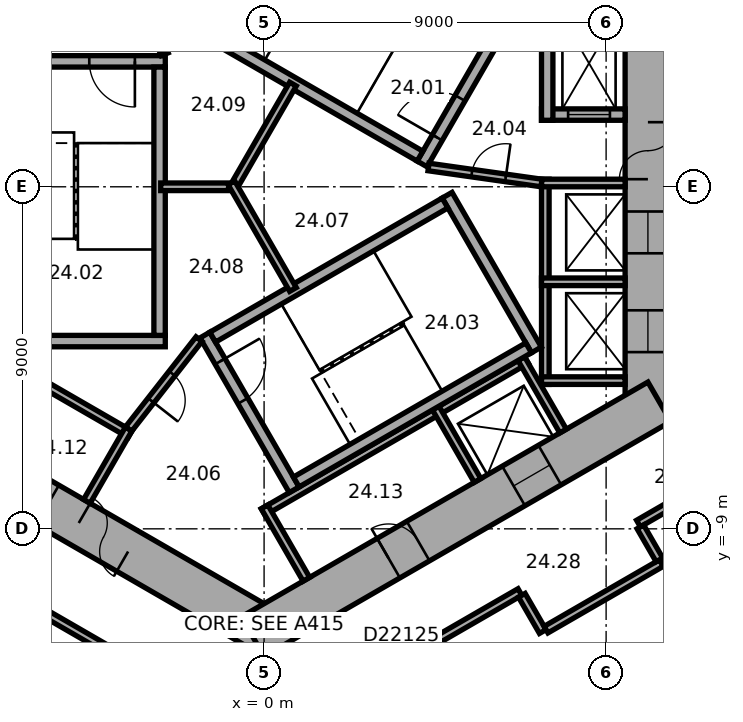
"""IFC4 building model, lengths in metres.
Left out: names, types, materials, properties, quantities, classifications, styles, units other than length and angle.
Written with IfcOpenShell. Run it as: python <this file> out.ifc"""

import sys

from ifc_helpers import new_model, si_unit, direction, frame, frame_2d, origin, place, context, subcontext, project, spatial, rectangle, extrude, element, fill, save


model = new_model("IFC4")
c1 = context("Model", 3, precision=1e-05, world=origin(), true_north=direction((0.0, 1.0)))
c2 = subcontext(c1, "Body", "Model", "MODEL_VIEW")
j1 = project(units=[si_unit("LENGTHUNIT", "METRE"), si_unit("PLANEANGLEUNIT", "RADIAN")], contexts=[c1])
p1 = place(None, origin())
s1 = spatial("IfcSite", under=j1, at=p1, CompositionType="ELEMENT")
p2 = place(p1, origin())
s2 = spatial("IfcBuilding", under=s1, at=p2, CompositionType="ELEMENT")
p3 = place(p2, frame((0.0, 0.0, 103.4)))
s3 = spatial("IfcBuildingStorey", under=s2, at=p3, CompositionType="ELEMENT", Elevation=103.4)
p4 = place(p3, frame((10.1, -6.177, 0.0), z_axis=(0.0, 0.0, 1.0), x_axis=(0.0, 1.0, 0.0)))
e1 = element("IfcWall", 1, at=p4, inside=s3, PredefinedType="SHEAR", context=c2, shape_type="SweptSolid", body=[
    extrude(rectangle(XDim=12.355, YDim=1.2, at=frame_2d((6.177, 0.0))), origin(), (0.0, 0.0, 1.0), 3.3),
])
p5 = place(p4, frame((6.378, 0.0, 0.0)))
e2 = element("IfcOpeningElement", 2, at=p5, cuts=e1, PredefinedType="OPENING", context=c2, shape_type="SweptSolid", body=[
    extrude(rectangle(XDim=1.5, YDim=2.1, at=frame_2d((0.75, 1.05))), frame((0.0, 0.61, 0.0), z_axis=(0.0, -1.0, 0.0), x_axis=(1.0, 0.0, 0.0)), (0.0, 0.0, 1.0), 1.22),
])
p6 = place(p4, frame((1.828, 0.0, 0.0)))
e3 = element("IfcOpeningElement", 3, at=p6, cuts=e1, PredefinedType="OPENING", context=c2, shape_type="SweptSolid", body=[
    extrude(rectangle(XDim=1.1, YDim=2.1, at=frame_2d((0.55, 1.05))), frame((0.0, 0.61, 0.0), z_axis=(0.0, -1.0, 0.0), x_axis=(1.0, 0.0, 0.0)), (0.0, 0.0, 1.0), 1.22),
])
p7 = place(p4, frame((4.427, 0.0, 0.0)))
e4 = element("IfcOpeningElement", 4, at=p7, cuts=e1, PredefinedType="OPENING", context=c2, shape_type="SweptSolid", body=[
    extrude(rectangle(XDim=1.1, YDim=2.1, at=frame_2d((0.55, 1.05))), frame((0.0, 0.61, 0.0), z_axis=(0.0, -1.0, 0.0), x_axis=(1.0, 0.0, 0.0)), (0.0, 0.0, 1.0), 1.22),
])
p8 = place(p3, frame((-10.4, -5.658, 0.0), z_axis=(0.0, 0.0, 1.0), x_axis=(0.866021384402, -0.500006961711, 0.0)))
e5 = element("IfcWall", 5, at=p8, inside=s3, PredefinedType="SHEAR", context=c2, shape_type="SweptSolid", body=[
    extrude(rectangle(XDim=12.355, YDim=1.2, at=frame_2d((6.178, 0.0))), origin(), (0.0, 0.0, 1.0), 3.3),
])
p9 = place(p8, frame((6.378, 0.0, 0.0)))
e6 = element("IfcOpeningElement", 6, at=p9, cuts=e5, PredefinedType="OPENING", context=c2, shape_type="SweptSolid", body=[
    extrude(rectangle(XDim=1.5, YDim=2.1, at=frame_2d((0.75, 1.05))), frame((0.0, 0.61, 0.0), z_axis=(0.0, -1.0, 0.0), x_axis=(1.0, 0.0, 0.0)), (0.0, 0.0, 1.0), 1.22),
])
p10 = place(p8, frame((1.928, 0.0, 0.0)))
e7 = element("IfcOpeningElement", 7, at=p10, cuts=e5, PredefinedType="OPENING", context=c2, shape_type="SweptSolid", body=[
    extrude(rectangle(XDim=0.9, YDim=2.1, at=frame_2d((0.45, 1.05))), frame((0.0, 0.61, 0.0), z_axis=(0.0, -1.0, 0.0), x_axis=(1.0, 0.0, 0.0)), (0.0, 0.0, 1.0), 1.22),
])
p11 = place(p8, frame((4.528, 0.0, 0.0)))
e8 = element("IfcOpeningElement", 8, at=p11, cuts=e5, PredefinedType="OPENING", context=c2, shape_type="SweptSolid", body=[
    extrude(rectangle(XDim=0.9, YDim=2.1, at=frame_2d((0.45, 1.05))), frame((0.0, 0.61, 0.0), z_axis=(0.0, -1.0, 0.0), x_axis=(1.0, 0.0, 0.0)), (0.0, 0.0, 1.0), 1.22),
])
p12 = place(p3, frame((-0.3, -11.836, 0.0), z_axis=(0.0, 0.0, 1.0), x_axis=(0.866021384402, 0.500006961711, 0.0)))
e9 = element("IfcWall", 9, at=p12, inside=s3, PredefinedType="SHEAR", context=c2, shape_type="SweptSolid", body=[
    extrude(rectangle(XDim=12.355, YDim=1.2, at=frame_2d((6.178, 0.0))), origin(), (0.0, 0.0, 1.0), 3.3),
])
p13 = place(p12, frame((4.128, 0.0, 0.0)))
e10 = element("IfcOpeningElement", 10, at=p13, cuts=e9, PredefinedType="OPENING", context=c2, shape_type="SweptSolid", body=[
    extrude(rectangle(XDim=0.9, YDim=2.1, at=frame_2d((0.45, 1.05))), frame((0.0, 0.61, 0.0), z_axis=(0.0, -1.0, 0.0), x_axis=(1.0, 0.0, 0.0)), (0.0, 0.0, 1.0), 1.22),
])
p14 = place(p12, frame((7.928, 0.0, 0.0)))
e11 = element("IfcOpeningElement", 11, at=p14, cuts=e9, PredefinedType="OPENING", context=c2, shape_type="SweptSolid", body=[
    extrude(rectangle(XDim=1.1, YDim=2.1, at=frame_2d((0.55, 1.05))), frame((0.0, 0.61, 0.0), z_axis=(0.0, -1.0, 0.0), x_axis=(1.0, 0.0, 0.0)), (0.0, 0.0, 1.0), 1.22),
])
p15 = place(p3, frame((7.4, -5.2, 0.0), z_axis=(0.0, 0.0, 1.0), x_axis=(0.0, 1.0, 0.0)))
e12 = element("IfcWall", 12, at=p15, inside=s3, PredefinedType="PARTITIONING", context=c2, shape_type="SweptSolid", body=[
    extrude(rectangle(XDim=5.4, YDim=0.2, at=frame_2d((2.7, 0.0))), origin(), (0.0, 0.0, 1.0), 3.05),
])
for number, where, z_axis, x_axis in (
    (13, (7.3, -5.1, 0.0), (0.0, 0.0, 1.0), (1.0, 0.0, 0.0)),
    (14, (7.3, -2.5, 0.0), (0.0, 0.0, 1.0), (1.0, 0.0, 0.0)),
    (15, (7.3, 0.1, 0.0), (0.0, 0.0, 1.0), (1.0, 0.0, 0.0)),
):
    element("IfcWall", number, at=place(p3, frame(where, z_axis=z_axis, x_axis=x_axis)), inside=s3, PredefinedType="PARTITIONING", context=c2, shape_type="SweptSolid", body=[
        extrude(rectangle(XDim=2.2, YDim=0.2, at=frame_2d((1.1, 0.0))), origin(), (0.0, 0.0, 1.0), 3.05),
    ])
p16 = place(p3, frame((-8.203, -3.809, 0.0), z_axis=(0.0, 0.0, 1.0), x_axis=(0.866028230842, -0.499995103361, 0.0)))
e16 = element("IfcWall", 16, at=p16, inside=s3, PredefinedType="PARTITIONING", context=c2, shape_type="SweptSolid", body=[
    extrude(rectangle(XDim=5.4, YDim=0.2, at=frame_2d((2.7, 0.0))), origin(), (0.0, 0.0, 1.0), 3.05),
])
p17 = place(p3, frame((-3.563, -6.372, 0.0), z_axis=(0.0, 0.0, 1.0), x_axis=(-0.499994660107, -0.866028486751, 0.0)))
e17 = element("IfcWall", 17, at=p17, inside=s3, PredefinedType="PARTITIONING", context=c2, shape_type="SweptSolid", body=[
    extrude(rectangle(XDim=2.2, YDim=0.2, at=frame_2d((1.1, 0.0))), origin(), (0.0, 0.0, 1.0), 3.05),
])
p18 = place(p3, frame((-0.024, -8.559, 0.0), z_axis=(0.0, 0.0, 1.0), x_axis=(0.866026010844, 0.49999894854, 0.0)))
e18 = element("IfcWall", 18, at=p18, inside=s3, PredefinedType="PARTITIONING", context=c2, shape_type="SweptSolid", body=[
    extrude(rectangle(XDim=8.0, YDim=0.2, at=frame_2d((4.0, 0.0))), origin(), (0.0, 0.0, 1.0), 3.05),
])
for number, where, z_axis, x_axis in (
    (19, (0.013, -8.422, 0.0), (0.0, 0.0, 1.0), (0.5, -0.866, 0.0)),
    (20, (4.516, -5.822, 0.0), (0.0, 0.0, 1.0), (0.5, -0.866, 0.0)),
    (21, (6.768, -4.522, 0.0), (0.0, 0.0, 1.0), (0.5, -0.866, 0.0)),
):
    element("IfcWall", number, at=place(p3, frame(where, z_axis=z_axis, x_axis=x_axis)), inside=s3, PredefinedType="PARTITIONING", context=c2, shape_type="SweptSolid", body=[
        extrude(rectangle(XDim=2.2, YDim=0.2, at=frame_2d((1.1, 0.0))), origin(), (0.0, 0.0, 1.0), 3.05),
    ])
p19 = place(p3, frame((4.158, 0.602, 0.0), z_axis=(0.0, 0.0, 1.0), x_axis=(0.499977259774, 0.866038532462, 0.0)))
e22 = element("IfcWall", 22, at=p19, inside=s3, PredefinedType="SHEAR", context=c2, shape_type="SweptSolid", body=[
    extrude(rectangle(XDim=4.7, YDim=0.3, at=frame_2d((2.35, 0.0))), origin(), (0.0, 0.0, 1.0), 3.05),
])
p20 = place(p19, frame((0.8, 0.0, 0.0)))
e23 = element("IfcOpeningElement", 23, at=p20, cuts=e22, PredefinedType="OPENING", context=c2, shape_type="SweptSolid", body=[
    extrude(rectangle(XDim=1.2, YDim=2.1, at=frame_2d((0.6, 1.05))), frame((0.0, 0.16, 0.0), z_axis=(0.0, -1.0, 0.0), x_axis=(1.0, 0.0, 0.0)), (0.0, 0.0, 1.0), 0.32),
])
p21 = place(p3, frame((4.103, 0.807, 0.0), z_axis=(0.0, 0.0, 1.0), x_axis=(-0.866027801685, 0.499995846692, 0.0)))
e24 = element("IfcWall", 24, at=p21, inside=s3, PredefinedType="SHEAR", context=c2, shape_type="SweptSolid", body=[
    extrude(rectangle(XDim=7.06, YDim=0.3, at=frame_2d((3.53, 0.0))), origin(), (0.0, 0.0, 1.0), 3.05),
])
p22 = place(p3, frame((-2.6, 3.3, 0.0), z_axis=(0.0, 0.0, 1.0), x_axis=(-1.0, 0.0, 0.0)))
e25 = element("IfcWall", 25, at=p22, inside=s3, PredefinedType="SHEAR", context=c2, shape_type="SweptSolid", body=[
    extrude(rectangle(XDim=4.7, YDim=0.3, at=frame_2d((2.35, 0.0))), origin(), (0.0, 0.0, 1.0), 3.05),
])
p23 = place(p22, frame((0.8, 0.0, 0.0)))
e26 = element("IfcOpeningElement", 26, at=p23, cuts=e25, PredefinedType="OPENING", context=c2, shape_type="SweptSolid", body=[
    extrude(rectangle(XDim=1.2, YDim=2.1, at=frame_2d((0.6, 1.05))), frame((0.0, 0.16, 0.0), z_axis=(0.0, -1.0, 0.0), x_axis=(1.0, 0.0, 0.0)), (0.0, 0.0, 1.0), 0.32),
])
p24 = place(p3, frame((-2.6, -4.06, 0.0), z_axis=(0.0, 0.0, 1.0), x_axis=(-1.0, 0.0, 0.0)))
e27 = element("IfcWall", 27, at=p24, inside=s3, PredefinedType="SHEAR", context=c2, shape_type="SweptSolid", body=[
    extrude(rectangle(XDim=4.7, YDim=0.3, at=frame_2d((2.35, 0.0))), origin(), (0.0, 0.0, 1.0), 3.05),
])
p25 = place(p3, frame((-2.75, 3.15, 0.0), z_axis=(0.0, 0.0, 1.0), x_axis=(0.0, -1.0, 0.0)))
e28 = element("IfcWall", 28, at=p25, inside=s3, PredefinedType="SHEAR", context=c2, shape_type="SweptSolid", body=[
    extrude(rectangle(XDim=7.06, YDim=0.3, at=frame_2d((3.53, 0.0))), origin(), (0.0, 0.0, 1.0), 3.05),
])
p26 = place(p3, frame((-1.558, -3.902, 0.0), z_axis=(0.0, 0.0, 1.0), x_axis=(0.499977259774, -0.866038532462, 0.0)))
e29 = element("IfcWall", 29, at=p26, inside=s3, PredefinedType="SHEAR", context=c2, shape_type="SweptSolid", body=[
    extrude(rectangle(XDim=4.7, YDim=0.3, at=frame_2d((2.35, 0.0))), origin(), (0.0, 0.0, 1.0), 3.05),
])
p27 = place(p26, frame((0.8, 0.0, 0.0)))
e30 = element("IfcOpeningElement", 30, at=p27, cuts=e29, PredefinedType="OPENING", context=c2, shape_type="SweptSolid", body=[
    extrude(rectangle(XDim=1.2, YDim=2.1, at=frame_2d((0.6, 1.05))), frame((0.0, 0.16, 0.0), z_axis=(0.0, -1.0, 0.0), x_axis=(1.0, 0.0, 0.0)), (0.0, 0.0, 1.0), 0.32),
])
p28 = place(p3, frame((4.816, -0.222, 0.0), z_axis=(0.0, 0.0, 1.0), x_axis=(0.499977259774, -0.866038532462, 0.0)))
e31 = element("IfcWall", 31, at=p28, inside=s3, PredefinedType="SHEAR", context=c2, shape_type="SweptSolid", body=[
    extrude(rectangle(XDim=4.7, YDim=0.3, at=frame_2d((2.35, 0.0))), origin(), (0.0, 0.0, 1.0), 3.05),
])
for number, where, z_axis, x_axis in (
    (32, (-1.353, -3.957, 0.0), (0.0, 0.0, 1.0), (0.866, 0.5, 0.0)),
    (33, (0.847, -7.767, 0.0), (0.0, 0.0, 1.0), (0.866, 0.5, 0.0)),
):
    element("IfcWall", number, at=place(p3, frame(where, z_axis=z_axis, x_axis=x_axis)), inside=s3, PredefinedType="SHEAR", context=c2, shape_type="SweptSolid", body=[
        extrude(rectangle(XDim=7.06, YDim=0.3, at=frame_2d((3.53, 0.0))), origin(), (0.0, 0.0, 1.0), 3.05),
    ])
p29 = place(p3, frame((7.3, 1.9, 0.0), z_axis=(0.0, 0.0, 1.0), x_axis=(1.0, 0.0, 0.0)))
e34 = element("IfcWall", 34, at=p29, inside=s3, PredefinedType="SHEAR", context=c2, shape_type="SweptSolid", body=[
    extrude(rectangle(XDim=2.2, YDim=0.3, at=frame_2d((1.1, 0.0))), origin(), (0.0, 0.0, 1.0), 3.05),
])
p30 = place(p29, frame((0.7, 0.0, 0.0)))
e35 = element("IfcOpeningElement", 35, at=p30, cuts=e34, PredefinedType="OPENING", context=c2, shape_type="SweptSolid", body=[
    extrude(rectangle(XDim=1.1, YDim=2.1, at=frame_2d((0.55, 1.05))), frame((0.0, 0.16, 0.0), z_axis=(0.0, -1.0, 0.0), x_axis=(1.0, 0.0, 0.0)), (0.0, 0.0, 1.0), 0.32),
])
p31 = place(p3, frame((7.45, 1.75, 0.0), z_axis=(0.0, 0.0, 1.0), x_axis=(0.0, 1.0, 0.0)))
e36 = element("IfcWall", 36, at=p31, inside=s3, PredefinedType="SHEAR", context=c2, shape_type="SweptSolid", body=[
    extrude(rectangle(XDim=3.35, YDim=0.3, at=frame_2d((1.675, 0.0))), origin(), (0.0, 0.0, 1.0), 3.05),
])
p32 = place(p3, frame((4.327, 0.521, 0.0), z_axis=(0.0, 0.0, 1.0), x_axis=(0.990124376366, -0.14019172346, 0.0)))
e37 = element("IfcWall", 37, at=p32, inside=s3, PredefinedType="PARTITIONING", context=c2, shape_type="SweptSolid", body=[
    extrude(rectangle(XDim=3.002, YDim=0.2, at=frame_2d((1.501, 0.0))), origin(), (0.0, 0.0, 1.0), 3.05),
])
p33 = place(p32, frame((1.15, 0.0, 0.0)))
e38 = element("IfcOpeningElement", 38, at=p33, cuts=e37, PredefinedType="OPENING", context=c2, shape_type="SweptSolid", body=[
    extrude(rectangle(XDim=0.9, YDim=2.1, at=frame_2d((0.45, 1.05))), frame((0.0, 0.11, 0.0), z_axis=(0.0, -1.0, 0.0), x_axis=(1.0, 0.0, 0.0)), (0.0, 0.0, 1.0), 0.22),
])
p34 = place(p3, frame((-2.615, 3.487, 0.0), z_axis=(0.0, 0.0, 1.0), x_axis=(-0.373576831041, 0.92759924068, 0.0)))
e39 = element("IfcWall", 39, at=p34, inside=s3, PredefinedType="PARTITIONING", context=c2, shape_type="SweptSolid", body=[
    extrude(rectangle(XDim=3.002, YDim=0.2, at=frame_2d((1.501, 0.0))), origin(), (0.0, 0.0, 1.0), 3.05),
])
p35 = place(p34, frame((1.15, 0.0, 0.0)))
e40 = element("IfcOpeningElement", 40, at=p35, cuts=e39, PredefinedType="OPENING", context=c2, shape_type="SweptSolid", body=[
    extrude(rectangle(XDim=0.9, YDim=2.1, at=frame_2d((0.45, 1.05))), frame((0.0, 0.11, 0.0), z_axis=(0.0, -1.0, 0.0), x_axis=(1.0, 0.0, 0.0)), (0.0, 0.0, 1.0), 0.22),
])
p36 = place(p3, frame((-1.712, -4.008, 0.0), z_axis=(0.0, 0.0, 1.0), x_axis=(-0.616549420702, -0.787316208287, 0.0)))
e41 = element("IfcWall", 41, at=p36, inside=s3, PredefinedType="PARTITIONING", context=c2, shape_type="SweptSolid", body=[
    extrude(rectangle(XDim=3.002, YDim=0.2, at=frame_2d((1.501, 0.0))), origin(), (0.0, 0.0, 1.0), 3.05),
])
p37 = place(p36, frame((1.15, 0.0, 0.0)))
e42 = element("IfcOpeningElement", 42, at=p37, cuts=e41, PredefinedType="OPENING", context=c2, shape_type="SweptSolid", body=[
    extrude(rectangle(XDim=0.9, YDim=2.1, at=frame_2d((0.45, 1.05))), frame((0.0, 0.11, 0.0), z_axis=(0.0, -1.0, 0.0), x_axis=(1.0, 0.0, 0.0)), (0.0, 0.0, 1.0), 0.22),
])
p38 = place(p3, frame((-0.68, 0.0, 0.0), z_axis=(0.0, 0.0, 1.0), x_axis=(-1.0, 0.0, 0.0)))
e43 = element("IfcWall", 43, at=p38, inside=s3, PredefinedType="PARTITIONING", context=c2, shape_type="SweptSolid", body=[
    extrude(rectangle(XDim=2.04, YDim=0.2, at=frame_2d((1.02, 0.0))), origin(), (0.0, 0.0, 1.0), 3.05),
])
for number, where, z_axis, x_axis in (
    (44, (-0.86, -0.104, 0.0), (0.0, 0.0, 1.0), (0.5, 0.866, 0.0)),
    (45, (-0.86, 0.104, 0.0), (0.0, 0.0, 1.0), (0.5, -0.866, 0.0)),
):
    element("IfcWall", number, at=place(p3, frame(where, z_axis=z_axis, x_axis=x_axis)), inside=s3, PredefinedType="PARTITIONING", context=c2, shape_type="SweptSolid", body=[
        extrude(rectangle(XDim=3.24, YDim=0.2, at=frame_2d((1.62, 0.0))), origin(), (0.0, 0.0, 1.0), 3.05),
    ])
p39 = place(p3, frame((-11.615, -7.843, 0.0), z_axis=(0.0, 0.0, 1.0), x_axis=(0.866026466995, -0.499998158461, 0.0)))
e46 = element("IfcWall", 46, at=p39, inside=s3, PredefinedType="PARTITIONING", context=c2, shape_type="SweptSolid", body=[
    extrude(rectangle(XDim=12.315, YDim=0.2, at=frame_2d((6.158, 0.0))), origin(), (0.0, 0.0, 1.0), 3.05),
])
p40 = place(p39, frame((3.333, 0.0, 0.0)))
e47 = element("IfcOpeningElement", 47, at=p40, cuts=e46, PredefinedType="OPENING", context=c2, shape_type="SweptSolid", body=[
    extrude(rectangle(XDim=0.9, YDim=2.1, at=frame_2d((0.45, 1.05))), frame((0.0, 0.11, 0.0), z_axis=(0.0, -1.0, 0.0), x_axis=(1.0, 0.0, 0.0)), (0.0, 0.0, 1.0), 0.22),
])
p41 = place(p39, frame((10.229, 0.0, 0.0)))
e48 = element("IfcOpeningElement", 48, at=p41, cuts=e46, PredefinedType="OPENING", context=c2, shape_type="SweptSolid", body=[
    extrude(rectangle(XDim=0.9, YDim=2.1, at=frame_2d((0.45, 1.05))), frame((0.0, 0.11, 0.0), z_axis=(0.0, -1.0, 0.0), x_axis=(1.0, 0.0, 0.0)), (0.0, 0.0, 1.0), 0.22),
])
p42 = place(p3, frame((1.033, -13.953, 0.0), z_axis=(0.0, 0.0, 1.0), x_axis=(0.866017531406, 0.500013635111, 0.0)))
e49 = element("IfcWall", 49, at=p42, inside=s3, PredefinedType="PARTITIONING", context=c2, shape_type="SweptSolid", body=[
    extrude(rectangle(XDim=6.58, YDim=0.2, at=frame_2d((3.29, 0.0))), origin(), (0.0, 0.0, 1.0), 3.05),
])
p43 = place(p42, frame((2.79, 0.0, 0.0)))
e50 = element("IfcOpeningElement", 50, at=p43, cuts=e49, PredefinedType="OPENING", context=c2, shape_type="SweptSolid", body=[
    extrude(rectangle(XDim=1.0, YDim=2.1, at=frame_2d((0.5, 1.05))), frame((0.0, 0.11, 0.0), z_axis=(0.0, -1.0, 0.0), x_axis=(1.0, 0.0, 0.0)), (0.0, 0.0, 1.0), 0.22),
])
p44 = place(p3, frame((6.782, -10.749, 0.0), z_axis=(0.0, 0.0, 1.0), x_axis=(0.500074377092, -0.865982457891, 0.0)))
e51 = element("IfcWall", 51, at=p44, inside=s3, PredefinedType="PARTITIONING", context=c2, shape_type="SweptSolid", body=[
    extrude(rectangle(XDim=1.101, YDim=0.2, at=frame_2d((0.55, 0.0))), origin(), (0.0, 0.0, 1.0), 3.05),
])
p45 = place(p3, frame((7.419, -11.653, 0.0), z_axis=(0.0, 0.0, 1.0), x_axis=(0.866038154057, 0.49997791523, 0.0)))
e52 = element("IfcWall", 52, at=p45, inside=s3, PredefinedType="PARTITIONING", context=c2, shape_type="SweptSolid", body=[
    extrude(rectangle(XDim=3.502, YDim=0.2, at=frame_2d((1.751, 0.0))), origin(), (0.0, 0.0, 1.0), 3.05),
])
p46 = place(p3, frame((9.852, -8.861, 0.0), z_axis=(0.0, 0.0, 1.0), x_axis=(0.866013291437, 0.500020978615, 0.0)))
e53 = element("IfcWall", 53, at=p46, inside=s3, PredefinedType="PARTITIONING", context=c2, shape_type="SweptSolid", body=[
    extrude(rectangle(XDim=2.077, YDim=0.2, at=frame_2d((1.038, 0.0))), origin(), (0.0, 0.0, 1.0), 3.05),
])
p47 = place(p3, frame((10.402, -9.815, 0.0), z_axis=(0.0, 0.0, 1.0), x_axis=(-0.499968756647, 0.866043441391, 0.0)))
e54 = element("IfcWall", 54, at=p47, inside=s3, PredefinedType="PARTITIONING", context=c2, shape_type="SweptSolid", body=[
    extrude(rectangle(XDim=1.001, YDim=0.2, at=frame_2d((0.5, 0.0))), origin(), (0.0, 0.0, 1.0), 3.05),
])
p48 = place(p5, origin())
e55 = element("IfcDoor", 55, at=p48, inside=s3, OperationType="DOUBLE_DOOR_SINGLE_SWING", PredefinedType="DOOR", context=c2, shape_type="SweptSolid", body=[
    extrude(rectangle(XDim=1.5, YDim=2.1, at=frame_2d((0.75, 1.05))), frame((0.0, 0.025, 0.0), z_axis=(0.0, -1.0, 0.0), x_axis=(1.0, 0.0, 0.0)), (0.0, 0.0, 1.0), 0.05),
])
fill(e2, e55)
p49 = place(p9, origin())
e56 = element("IfcDoor", 56, at=p49, inside=s3, OperationType="DOUBLE_DOOR_SINGLE_SWING", PredefinedType="DOOR", context=c2, shape_type="SweptSolid", body=[
    extrude(rectangle(XDim=1.5, YDim=2.1, at=frame_2d((0.75, 1.05))), frame((0.0, 0.025, 0.0), z_axis=(0.0, -1.0, 0.0), x_axis=(1.0, 0.0, 0.0)), (0.0, 0.0, 1.0), 0.05),
])
fill(e6, e56)
p50 = place(p20, origin())
e57 = element("IfcDoor", 57, at=p50, inside=s3, OperationType="SINGLE_SWING_RIGHT", PredefinedType="DOOR", context=c2, shape_type="SweptSolid", body=[
    extrude(rectangle(XDim=1.2, YDim=2.1, at=frame_2d((0.6, 1.05))), frame((0.0, 0.025, 0.0), z_axis=(0.0, -1.0, 0.0), x_axis=(1.0, 0.0, 0.0)), (0.0, 0.0, 1.0), 0.05),
])
fill(e23, e57)
p51 = place(p23, origin())
e58 = element("IfcDoor", 58, at=p51, inside=s3, OperationType="SINGLE_SWING_RIGHT", PredefinedType="DOOR", context=c2, shape_type="SweptSolid", body=[
    extrude(rectangle(XDim=1.2, YDim=2.1, at=frame_2d((0.6, 1.05))), frame((0.0, 0.025, 0.0), z_axis=(0.0, -1.0, 0.0), x_axis=(1.0, 0.0, 0.0)), (0.0, 0.0, 1.0), 0.05),
])
fill(e26, e58)
p52 = place(p27, origin())
e59 = element("IfcDoor", 59, at=p52, inside=s3, OperationType="SINGLE_SWING_RIGHT", PredefinedType="DOOR", context=c2, shape_type="SweptSolid", body=[
    extrude(rectangle(XDim=1.2, YDim=2.1, at=frame_2d((0.6, 1.05))), frame((0.0, 0.025, 0.0), z_axis=(0.0, -1.0, 0.0), x_axis=(1.0, 0.0, 0.0)), (0.0, 0.0, 1.0), 0.05),
])
fill(e30, e59)
p53 = place(p33, origin())
e60 = element("IfcDoor", 60, at=p53, inside=s3, OperationType="SINGLE_SWING_LEFT", PredefinedType="DOOR", context=c2, shape_type="SweptSolid", body=[
    extrude(rectangle(XDim=0.9, YDim=2.1, at=frame_2d((0.45, 1.05))), frame((0.0, 0.025, 0.0), z_axis=(0.0, -1.0, 0.0), x_axis=(1.0, 0.0, 0.0)), (0.0, 0.0, 1.0), 0.05),
])
fill(e38, e60)
p54 = place(p37, origin())
e61 = element("IfcDoor", 61, at=p54, inside=s3, OperationType="SINGLE_SWING_LEFT", PredefinedType="DOOR", context=c2, shape_type="SweptSolid", body=[
    extrude(rectangle(XDim=0.9, YDim=2.1, at=frame_2d((0.45, 1.05))), frame((0.0, 0.025, 0.0), z_axis=(0.0, -1.0, 0.0), x_axis=(1.0, 0.0, 0.0)), (0.0, 0.0, 1.0), 0.05),
])
fill(e42, e61)
p55 = place(p13, origin())
e62 = element("IfcDoor", 62, at=p55, inside=s3, OperationType="SINGLE_SWING_LEFT", PredefinedType="DOOR", context=c2, shape_type="SweptSolid", body=[
    extrude(rectangle(XDim=0.9, YDim=2.1, at=frame_2d((0.45, 1.05))), frame((0.0, 0.025, 0.0), z_axis=(0.0, -1.0, 0.0), x_axis=(1.0, 0.0, 0.0)), (0.0, 0.0, 1.0), 0.05),
])
fill(e10, e62)
p56 = place(p30, origin())
e63 = element("IfcDoor", 63, at=p56, inside=s3, OperationType="DOUBLE_DOOR_SLIDING", PredefinedType="DOOR", context=c2, shape_type="SweptSolid", body=[
    extrude(rectangle(XDim=1.1, YDim=2.1, at=frame_2d((0.55, 1.05))), frame((0.0, 0.025, 0.0), z_axis=(0.0, -1.0, 0.0), x_axis=(1.0, 0.0, 0.0)), (0.0, 0.0, 1.0), 0.05),
])
fill(e35, e63)
p57 = place(p6, origin())
e64 = element("IfcDoor", 64, at=p57, inside=s3, OperationType="DOUBLE_DOOR_SLIDING", PredefinedType="DOOR", context=c2, shape_type="SweptSolid", body=[
    extrude(rectangle(XDim=1.1, YDim=2.1, at=frame_2d((0.55, 1.05))), frame((0.0, 0.025, 0.0), z_axis=(0.0, -1.0, 0.0), x_axis=(1.0, 0.0, 0.0)), (0.0, 0.0, 1.0), 0.05),
])
fill(e3, e64)
p58 = place(p7, origin())
e65 = element("IfcDoor", 65, at=p58, inside=s3, OperationType="DOUBLE_DOOR_SLIDING", PredefinedType="DOOR", context=c2, shape_type="SweptSolid", body=[
    extrude(rectangle(XDim=1.1, YDim=2.1, at=frame_2d((0.55, 1.05))), frame((0.0, 0.025, 0.0), z_axis=(0.0, -1.0, 0.0), x_axis=(1.0, 0.0, 0.0)), (0.0, 0.0, 1.0), 0.05),
])
fill(e4, e65)
p59 = place(p14, origin())
e66 = element("IfcDoor", 66, at=p59, inside=s3, OperationType="DOUBLE_DOOR_SLIDING", PredefinedType="DOOR", context=c2, shape_type="SweptSolid", body=[
    extrude(rectangle(XDim=1.1, YDim=2.1, at=frame_2d((0.55, 1.05))), frame((0.0, 0.025, 0.0), z_axis=(0.0, -1.0, 0.0), x_axis=(1.0, 0.0, 0.0)), (0.0, 0.0, 1.0), 0.05),
])
fill(e11, e66)
save(model, sys.argv[1])
